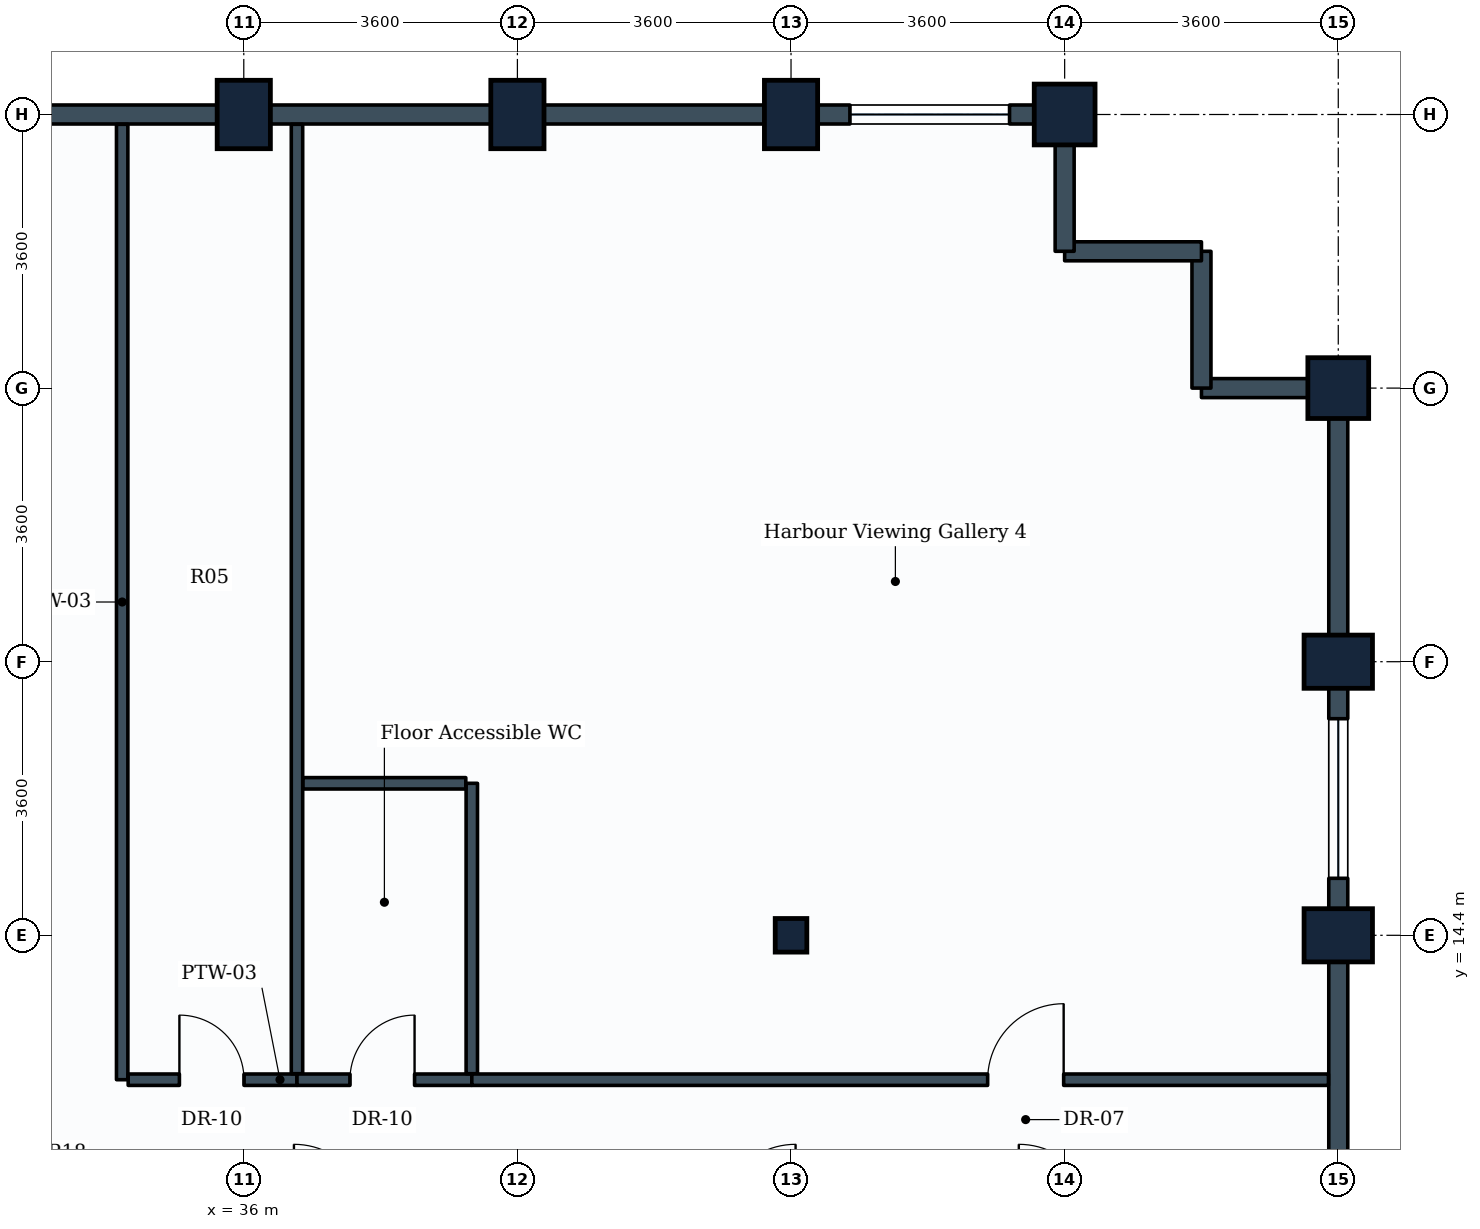
"""IFC4 building model, lengths in metres.
Left out: names, types, materials, properties, quantities, classifications, styles, units other than length and angle.
Written with IfcOpenShell. Run it as: python <this file> out.ifc"""

import sys

from ifc_helpers import new_model, si_unit, direction, frame, frame_2d, origin, origin_2d, place, context, subcontext, project, spatial, rectangle, i_section, extrude, element, fill, save


model = new_model("IFC4")
c1 = context("Model", 3, precision=1e-05, world=origin(), true_north=direction((0.0, 1.0)))
c2 = subcontext(c1, "Body", "Model", "MODEL_VIEW")
j1 = project(units=[si_unit("LENGTHUNIT", "METRE"), si_unit("PLANEANGLEUNIT", "RADIAN")], contexts=[c1])
p1 = place(None, origin())
s1 = spatial("IfcSite", under=j1, at=p1, CompositionType="ELEMENT")
p2 = place(p1, origin())
s2 = spatial("IfcBuilding", under=s1, at=p2, CompositionType="ELEMENT")
p3 = place(p2, frame((0.0, 0.0, 201.4)))
s3 = spatial("IfcBuildingStorey", under=s2, at=p3, CompositionType="ELEMENT", Elevation=201.4)
for number, where, z_axis, x_axis in (
    (1, (36.0, 25.2, 0.0), (0.0, 0.0, 1.0), (1.0, 0.0, 0.0)),
    (2, (39.6, 25.2, 0.0), (0.0, 0.0, 1.0), (1.0, 0.0, 0.0)),
):
    element("IfcColumn", number, at=place(p3, frame(where, z_axis=z_axis, x_axis=x_axis)), inside=s3, PredefinedType="COLUMN", context=c2, shape_type="SweptSolid", body=[
        extrude(rectangle(XDim=0.7, YDim=0.9, at=origin_2d()), origin(), (0.0, 0.0, 1.0), 3.8),
    ])
p4 = place(p3, frame((43.2, 14.4, 0.0), z_axis=(0.0, 0.0, 1.0), x_axis=(1.0, 0.0, 0.0)))
e3 = element("IfcColumn", 3, at=p4, inside=s3, PredefinedType="COLUMN", context=c2, shape_type="SweptSolid", body=[
    extrude(i_section(OverallWidth=0.416, OverallDepth=0.442, WebThickness=0.025, FlangeThickness=0.041, FilletRadius=0.015, at=origin_2d()), origin(), (0.0, 0.0, 1.0), 3.8),
])
p5 = place(p3, frame((43.2, 25.2, 0.0), z_axis=(0.0, 0.0, 1.0), x_axis=(1.0, 0.0, 0.0)))
e4 = element("IfcColumn", 4, at=p5, inside=s3, PredefinedType="COLUMN", context=c2, shape_type="SweptSolid", body=[
    extrude(rectangle(XDim=0.7, YDim=0.9, at=origin_2d()), origin(), (0.0, 0.0, 1.0), 3.8),
])
p6 = place(p3, frame((46.8, 25.2, 0.0), z_axis=(0.0, 0.0, 1.0), x_axis=(1.0, 0.0, 0.0)))
e5 = element("IfcColumn", 5, at=p6, inside=s3, PredefinedType="COLUMN", context=c2, shape_type="SweptSolid", body=[
    extrude(rectangle(XDim=0.8, YDim=0.8, at=origin_2d()), origin(), (0.0, 0.0, 1.0), 3.8),
])
for number, where, z_axis, x_axis in (
    (6, (50.4, 14.4, 0.0), (0.0, 0.0, 1.0), (0.0, 1.0, 0.0)),
    (7, (50.4, 18.0, 0.0), (0.0, 0.0, 1.0), (0.0, 1.0, 0.0)),
):
    element("IfcColumn", number, at=place(p3, frame(where, z_axis=z_axis, x_axis=x_axis)), inside=s3, PredefinedType="COLUMN", context=c2, shape_type="SweptSolid", body=[
        extrude(rectangle(XDim=0.7, YDim=0.9, at=origin_2d()), origin(), (0.0, 0.0, 1.0), 3.8),
    ])
p7 = place(p3, frame((50.4, 21.6, 0.0), z_axis=(0.0, 0.0, 1.0), x_axis=(0.0, 1.0, 0.0)))
e8 = element("IfcColumn", 8, at=p7, inside=s3, PredefinedType="COLUMN", context=c2, shape_type="SweptSolid", body=[
    extrude(rectangle(XDim=0.8, YDim=0.8, at=origin_2d()), origin(), (0.0, 0.0, 1.0), 3.8),
])
p8 = place(p3, frame((50.4, 14.4, 0.0), z_axis=(0.0, 0.0, 1.0), x_axis=(0.0, -1.0, 0.0)))
e9 = element("IfcWall", 9, at=p8, inside=s3, PredefinedType="STANDARD", context=c2, shape_type="SweptSolid", body=[
    extrude(rectangle(XDim=3.6, YDim=0.25, at=frame_2d((1.8, 0.0))), origin(), (0.0, 0.0, 1.0), 2.93),
])
p9 = place(p3, frame((50.4, 18.0, 0.0), z_axis=(0.0, 0.0, 1.0), x_axis=(0.0, -1.0, 0.0)))
e10 = element("IfcWall", 10, at=p9, inside=s3, PredefinedType="STANDARD", context=c2, shape_type="SweptSolid", body=[
    extrude(rectangle(XDim=3.6, YDim=0.25, at=frame_2d((1.8, 0.0))), origin(), (0.0, 0.0, 1.0), 2.93),
])
p10 = place(p9, frame((0.75, 0.0, 0.85)))
e11 = element("IfcOpeningElement", 11, at=p10, cuts=e10, PredefinedType="OPENING", context=c2, shape_type="SweptSolid", body=[
    extrude(rectangle(XDim=2.1, YDim=1.35, at=frame_2d((1.05, 0.675))), frame((0.0, 0.135, 0.0), z_axis=(0.0, -1.0, 0.0), x_axis=(1.0, 0.0, 0.0)), (0.0, 0.0, 1.0), 0.27),
])
p11 = place(p3, frame((50.4, 21.6, 0.0), z_axis=(0.0, 0.0, 1.0), x_axis=(0.0, -1.0, 0.0)))
e12 = element("IfcWall", 12, at=p11, inside=s3, PredefinedType="STANDARD", context=c2, shape_type="SweptSolid", body=[
    extrude(rectangle(XDim=3.6, YDim=0.25, at=frame_2d((1.8, 0.0))), origin(), (0.0, 0.0, 1.0), 2.93),
])
p12 = place(p3, frame((48.6, 21.6, 0.0), z_axis=(0.0, 0.0, 1.0), x_axis=(1.0, 0.0, 0.0)))
e13 = element("IfcWall", 13, at=p12, inside=s3, PredefinedType="STANDARD", context=c2, shape_type="SweptSolid", body=[
    extrude(rectangle(XDim=1.8, YDim=0.25, at=frame_2d((0.9, 0.0))), origin(), (0.0, 0.0, 1.0), 2.93),
])
p13 = place(p3, frame((48.6, 23.4, 0.0), z_axis=(0.0, 0.0, 1.0), x_axis=(0.0, -1.0, 0.0)))
e14 = element("IfcWall", 14, at=p13, inside=s3, PredefinedType="STANDARD", context=c2, shape_type="SweptSolid", body=[
    extrude(rectangle(XDim=1.8, YDim=0.25, at=frame_2d((0.9, 0.0))), origin(), (0.0, 0.0, 1.0), 3.535),
])
p14 = place(p3, frame((46.8, 23.4, 0.0), z_axis=(0.0, 0.0, 1.0), x_axis=(1.0, 0.0, 0.0)))
e15 = element("IfcWall", 15, at=p14, inside=s3, PredefinedType="STANDARD", context=c2, shape_type="SweptSolid", body=[
    extrude(rectangle(XDim=1.8, YDim=0.25, at=frame_2d((0.9, 0.0))), origin(), (0.0, 0.0, 1.0), 3.535),
])
p15 = place(p3, frame((46.8, 25.2, 0.0), z_axis=(0.0, 0.0, 1.0), x_axis=(0.0, -1.0, 0.0)))
e16 = element("IfcWall", 16, at=p15, inside=s3, PredefinedType="STANDARD", context=c2, shape_type="SweptSolid", body=[
    extrude(rectangle(XDim=1.8, YDim=0.25, at=frame_2d((0.9, 0.0))), origin(), (0.0, 0.0, 1.0), 2.93),
])
p16 = place(p3, frame((43.2, 25.2, 0.0), z_axis=(0.0, 0.0, 1.0), x_axis=(1.0, 0.0, 0.0)))
e17 = element("IfcWall", 17, at=p16, inside=s3, PredefinedType="STANDARD", context=c2, shape_type="SweptSolid", body=[
    extrude(rectangle(XDim=3.6, YDim=0.25, at=frame_2d((1.8, 0.0))), origin(), (0.0, 0.0, 1.0), 2.93),
])
p17 = place(p16, frame((0.775, 0.0, 0.85)))
e18 = element("IfcOpeningElement", 18, at=p17, cuts=e17, PredefinedType="OPENING", context=c2, shape_type="SweptSolid", body=[
    extrude(rectangle(XDim=2.1, YDim=1.35, at=frame_2d((1.05, 0.675))), frame((0.0, 0.135, 0.0), z_axis=(0.0, -1.0, 0.0), x_axis=(1.0, 0.0, 0.0)), (0.0, 0.0, 1.0), 0.27),
])
p18 = place(p3, frame((39.6, 25.2, 0.0), z_axis=(0.0, 0.0, 1.0), x_axis=(1.0, 0.0, 0.0)))
e19 = element("IfcWall", 19, at=p18, inside=s3, PredefinedType="STANDARD", context=c2, shape_type="SweptSolid", body=[
    extrude(rectangle(XDim=3.6, YDim=0.25, at=frame_2d((1.8, 0.0))), origin(), (0.0, 0.0, 1.0), 2.93),
])
for number, where, z_axis, x_axis in (
    (20, (36.0, 25.2, 0.0), (0.0, 0.0, 1.0), (1.0, 0.0, 0.0)),
    (21, (32.4, 25.2, 0.0), (0.0, 0.0, 1.0), (1.0, 0.0, 0.0)),
):
    element("IfcWall", number, at=place(p3, frame(where, z_axis=z_axis, x_axis=x_axis)), inside=s3, PredefinedType="STANDARD", context=c2, shape_type="SweptSolid", body=[
        extrude(rectangle(XDim=3.6, YDim=0.25, at=frame_2d((1.8, 0.0))), origin(), (0.0, 0.0, 1.0), 2.93),
    ])
p19 = place(p3, frame((34.4, 12.5, 0.0), z_axis=(0.0, 0.0, 1.0), x_axis=(0.0, 1.0, 0.0)))
e22 = element("IfcWall", 22, at=p19, inside=s3, PredefinedType="PARTITIONING", context=c2, shape_type="SweptSolid", body=[
    extrude(rectangle(XDim=12.571, YDim=0.15, at=frame_2d((6.286, 0.0))), origin(), (0.0, 0.0, 1.0), 2.93),
])
p20 = place(p3, frame((34.479, 12.5, 0.0), z_axis=(0.0, 0.0, 1.0), x_axis=(1.0, 0.0, 0.0)))
e23 = element("IfcWall", 23, at=p20, inside=s3, PredefinedType="PARTITIONING", context=c2, shape_type="SweptSolid", body=[
    extrude(rectangle(XDim=2.221, YDim=0.15, at=frame_2d((1.11, 0.0))), origin(), (0.0, 0.0, 1.0), 3.22),
])
p21 = place(p20, frame((0.674, 0.0, 0.0)))
e24 = element("IfcOpeningElement", 24, at=p21, cuts=e23, PredefinedType="OPENING", context=c2, shape_type="SweptSolid", body=[
    extrude(rectangle(XDim=0.85, YDim=2.1, at=frame_2d((0.425, 1.05))), frame((0.0, 0.085, 0.0), z_axis=(0.0, -1.0, 0.0), x_axis=(1.0, 0.0, 0.0)), (0.0, 0.0, 1.0), 0.17),
])
p22 = place(p3, frame((36.7, 12.579, 0.0), z_axis=(0.0, 0.0, 1.0), x_axis=(0.0, 1.0, 0.0)))
e25 = element("IfcWall", 25, at=p22, inside=s3, PredefinedType="PARTITIONING", context=c2, shape_type="SweptSolid", body=[
    extrude(rectangle(XDim=12.492, YDim=0.15, at=frame_2d((6.246, 0.0))), origin(), (0.0, 0.0, 1.0), 2.93),
])
p23 = place(p3, frame((36.7, 12.5, 0.0), z_axis=(0.0, 0.0, 1.0), x_axis=(1.0, 0.0, 0.0)))
e26 = element("IfcWall", 26, at=p23, inside=s3, PredefinedType="PARTITIONING", context=c2, shape_type="SweptSolid", body=[
    extrude(rectangle(XDim=2.3, YDim=0.15, at=frame_2d((1.15, 0.0))), origin(), (0.0, 0.0, 1.0), 3.535),
])
p24 = place(p23, frame((0.697, 0.0, 0.0)))
e27 = element("IfcOpeningElement", 27, at=p24, cuts=e26, PredefinedType="OPENING", context=c2, shape_type="SweptSolid", body=[
    extrude(rectangle(XDim=0.85, YDim=2.1, at=frame_2d((0.425, 1.05))), frame((0.0, 0.085, 0.0), z_axis=(0.0, -1.0, 0.0), x_axis=(1.0, 0.0, 0.0)), (0.0, 0.0, 1.0), 0.17),
])
p25 = place(p3, frame((39.0, 12.579, 0.0), z_axis=(0.0, 0.0, 1.0), x_axis=(0.0, 1.0, 0.0)))
e28 = element("IfcWall", 28, at=p25, inside=s3, PredefinedType="PARTITIONING", context=c2, shape_type="SweptSolid", body=[
    extrude(rectangle(XDim=3.821, YDim=0.15, at=frame_2d((1.91, 0.0))), origin(), (0.0, 0.0, 1.0), 3.17),
])
p26 = place(p3, frame((36.779, 16.4, 0.0), z_axis=(0.0, 0.0, 1.0), x_axis=(1.0, 0.0, 0.0)))
e29 = element("IfcWall", 29, at=p26, inside=s3, PredefinedType="PARTITIONING", context=c2, shape_type="SweptSolid", body=[
    extrude(rectangle(XDim=2.142, YDim=0.15, at=frame_2d((1.071, 0.0))), origin(), (0.0, 0.0, 1.0), 3.535),
])
p27 = place(p3, frame((39.0, 12.5, 0.0), z_axis=(0.0, 0.0, 1.0), x_axis=(1.0, 0.0, 0.0)))
e30 = element("IfcWall", 30, at=p27, inside=s3, PredefinedType="PARTITIONING", context=c2, shape_type="SweptSolid", body=[
    extrude(rectangle(XDim=11.271, YDim=0.15, at=frame_2d((5.635, 0.0))), origin(), (0.0, 0.0, 1.0), 2.93),
])
p28 = place(p27, frame((6.787, 0.0, 0.0)))
e31 = element("IfcOpeningElement", 31, at=p28, cuts=e30, PredefinedType="OPENING", context=c2, shape_type="SweptSolid", body=[
    extrude(rectangle(XDim=1.0, YDim=2.1, at=frame_2d((0.5, 1.05))), frame((0.0, 0.085, 0.0), z_axis=(0.0, -1.0, 0.0), x_axis=(1.0, 0.0, 0.0)), (0.0, 0.0, 1.0), 0.17),
])
p29 = place(p10, origin())
e32 = element("IfcWindow", 32, at=p29, inside=s3, PartitioningType="SINGLE_PANEL", PredefinedType="WINDOW", context=c2, shape_type="SweptSolid", body=[
    extrude(rectangle(XDim=2.1, YDim=1.35, at=frame_2d((1.05, 0.675))), frame((0.0, 0.03, 0.0), z_axis=(0.0, -1.0, 0.0), x_axis=(1.0, 0.0, 0.0)), (0.0, 0.0, 1.0), 0.06),
])
fill(e11, e32)
p30 = place(p17, origin())
e33 = element("IfcWindow", 33, at=p30, inside=s3, PartitioningType="SINGLE_PANEL", PredefinedType="WINDOW", context=c2, shape_type="SweptSolid", body=[
    extrude(rectangle(XDim=2.1, YDim=1.35, at=frame_2d((1.05, 0.675))), frame((0.0, 0.03, 0.0), z_axis=(0.0, -1.0, 0.0), x_axis=(1.0, 0.0, 0.0)), (0.0, 0.0, 1.0), 0.06),
])
fill(e18, e33)
p31 = place(p21, origin())
e34 = element("IfcDoor", 34, at=p31, inside=s3, OperationType="SINGLE_SWING_LEFT", PredefinedType="DOOR", context=c2, shape_type="SweptSolid", body=[
    extrude(rectangle(XDim=0.85, YDim=2.1, at=frame_2d((0.425, 1.05))), frame((0.0, 0.025, 0.0), z_axis=(0.0, -1.0, 0.0), x_axis=(1.0, 0.0, 0.0)), (0.0, 0.0, 1.0), 0.05),
])
fill(e24, e34)
p32 = place(p24, origin())
e35 = element("IfcDoor", 35, at=p32, inside=s3, OperationType="SINGLE_SWING_RIGHT", PredefinedType="DOOR", context=c2, shape_type="SweptSolid", body=[
    extrude(rectangle(XDim=0.85, YDim=2.1, at=frame_2d((0.425, 1.05))), frame((0.0, 0.025, 0.0), z_axis=(0.0, -1.0, 0.0), x_axis=(1.0, 0.0, 0.0)), (0.0, 0.0, 1.0), 0.05),
])
fill(e27, e35)
p33 = place(p28, origin())
e36 = element("IfcDoor", 36, at=p33, inside=s3, OperationType="SINGLE_SWING_RIGHT", PredefinedType="DOOR", context=c2, shape_type="SweptSolid", body=[
    extrude(rectangle(XDim=1.0, YDim=2.1, at=frame_2d((0.5, 1.05))), frame((0.0, 0.025, 0.0), z_axis=(0.0, -1.0, 0.0), x_axis=(1.0, 0.0, 0.0)), (0.0, 0.0, 1.0), 0.05),
])
fill(e31, e36)
save(model, sys.argv[1])
